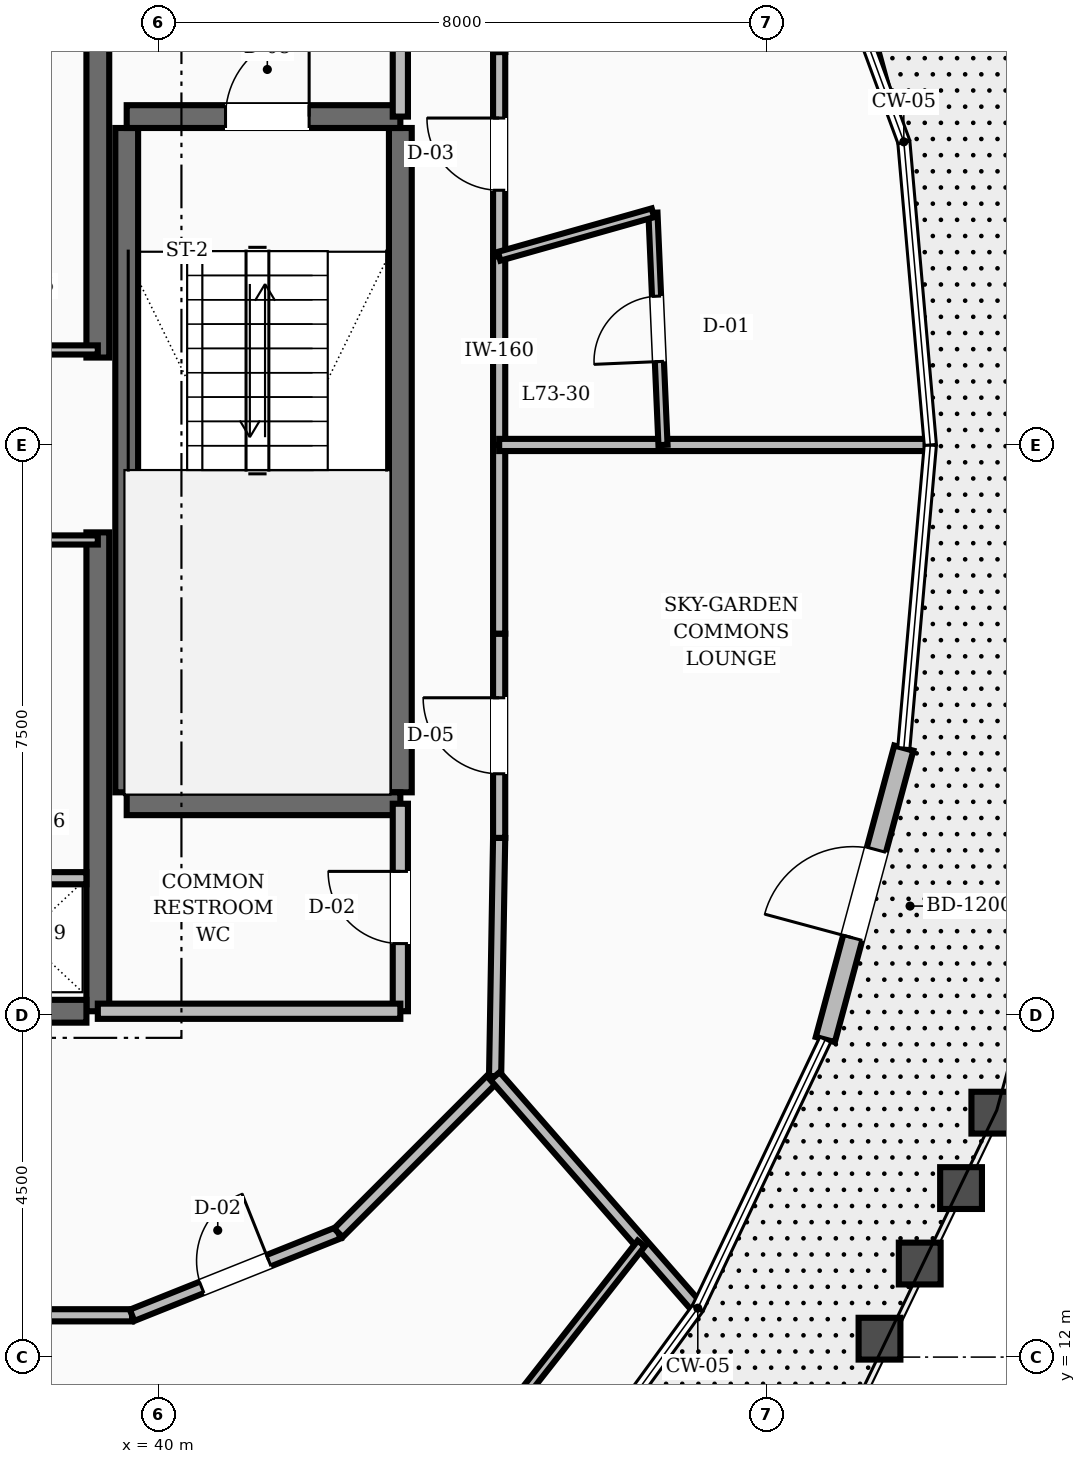
"""IFC4 building model, lengths in metres.
Left out: names, types, materials, properties, quantities, classifications, styles, units other than length and angle.
Written with IfcOpenShell. Run it as: python <this file> out.ifc"""

import sys

from ifc_helpers import new_model, si_unit, direction, frame, frame_2d, origin, place, context, subcontext, project, spatial, rectangle, extrude, element, fill, save


model = new_model("IFC4")
c1 = context("Model", 3, precision=1e-05, world=origin(), true_north=direction((0.0, 1.0)))
c2 = subcontext(c1, "Body", "Model", "MODEL_VIEW")
j1 = project(units=[si_unit("LENGTHUNIT", "METRE"), si_unit("PLANEANGLEUNIT", "RADIAN")], contexts=[c1])
p1 = place(None, origin())
s1 = spatial("IfcSite", under=j1, at=p1, CompositionType="ELEMENT")
p2 = place(p1, origin())
s2 = spatial("IfcBuilding", under=s1, at=p2, CompositionType="ELEMENT")
p3 = place(p2, frame((0.0, 0.0, 279.6)))
s3 = spatial("IfcBuildingStorey", under=s2, at=p3, CompositionType="ELEMENT", Elevation=279.6)
for number, where, z_axis, x_axis in (
    (1, (39.2, 16.55, 0.0), (0.0, 0.0, 1.0), (0.0, 1.0, 0.0)),
    (2, (39.2, 25.15, 0.0), (0.0, 0.0, 1.0), (0.0, 1.0, 0.0)),
):
    element("IfcWall", number, at=place(p3, frame(where, z_axis=z_axis, x_axis=x_axis)), inside=s3, PredefinedType="SHEAR", context=c2, shape_type="SweptSolid", body=[
        extrude(rectangle(XDim=6.3, YDim=0.3, at=frame_2d((3.15, 0.0))), origin(), (0.0, 0.0, 1.0), 3.6),
    ])
p4 = place(p3, frame((35.8, 16.55, 0.0), z_axis=(0.0, 0.0, 1.0), x_axis=(1.0, 0.0, 0.0)))
e3 = element("IfcWall", 3, at=p4, inside=s3, PredefinedType="SHEAR", context=c2, shape_type="SweptSolid", body=[
    extrude(rectangle(XDim=3.25, YDim=0.3, at=frame_2d((1.625, 0.0))), origin(), (0.0, 0.0, 1.0), 3.6),
])
p5 = place(p4, frame((0.3, 0.0, 0.0)))
e4 = element("IfcOpeningElement", 4, at=p5, cuts=e3, PredefinedType="OPENING", context=c2, shape_type="SweptSolid", body=[
    extrude(rectangle(XDim=1.1, YDim=2.1, at=frame_2d((0.55, 1.05))), frame((0.0, 0.16, 0.0), z_axis=(0.0, -1.0, 0.0), x_axis=(1.0, 0.0, 0.0)), (0.0, 0.0, 1.0), 0.32),
])
for number, where, z_axis, x_axis in (
    (5, (43.18, 19.43, 0.0), (0.0, 0.0, 1.0), (0.0, 1.0, 0.0)),
    (6, (39.58, 19.43, 0.0), (0.0, 0.0, 1.0), (0.0, 1.0, 0.0)),
):
    element("IfcWall", number, at=place(p3, frame(where, z_axis=z_axis, x_axis=x_axis)), inside=s3, PredefinedType="SHEAR", context=c2, shape_type="SweptSolid", body=[
        extrude(rectangle(XDim=8.74, YDim=0.3, at=frame_2d((4.37, 0.0))), origin(), (0.0, 0.0, 1.0), 3.6),
    ])
p6 = place(p3, frame((39.58, 19.28, 0.0), z_axis=(0.0, 0.0, 1.0), x_axis=(1.0, 0.0, 0.0)))
e7 = element("IfcWall", 7, at=p6, inside=s3, PredefinedType="SHEAR", context=c2, shape_type="SweptSolid", body=[
    extrude(rectangle(XDim=3.6, YDim=0.3, at=frame_2d((1.8, 0.0))), origin(), (0.0, 0.0, 1.0), 3.6),
])
p7 = place(p3, frame((39.58, 28.32, 0.0), z_axis=(0.0, 0.0, 1.0), x_axis=(1.0, 0.0, 0.0)))
e8 = element("IfcWall", 8, at=p7, inside=s3, PredefinedType="SHEAR", context=c2, shape_type="SweptSolid", body=[
    extrude(rectangle(XDim=3.6, YDim=0.3, at=frame_2d((1.8, 0.0))), origin(), (0.0, 0.0, 1.0), 3.6),
])
p8 = place(p7, frame((1.3, 0.0, 0.0)))
e9 = element("IfcOpeningElement", 9, at=p8, cuts=e8, PredefinedType="OPENING", context=c2, shape_type="SweptSolid", body=[
    extrude(rectangle(XDim=1.1, YDim=2.1, at=frame_2d((0.55, 1.05))), frame((0.0, 0.16, 0.0), z_axis=(0.0, -1.0, 0.0), x_axis=(1.0, 0.0, 0.0)), (0.0, 0.0, 1.0), 0.32),
])
p9 = place(p3, frame((48.771, 16.178, 0.0), z_axis=(0.0, 0.0, 1.0), x_axis=(0.260114573909, 0.965577758878, 0.0)))
e10 = element("IfcWall", 10, at=p9, inside=s3, PredefinedType="STANDARD", context=c2, shape_type="SweptSolid", body=[
    extrude(rectangle(XDim=3.971, YDim=0.26, at=frame_2d((1.986, 0.0))), origin(), (0.0, 0.0, 1.0), 2.88),
])
p10 = place(p9, frame((1.385, 0.0, 0.0)))
e11 = element("IfcOpeningElement", 11, at=p10, cuts=e10, PredefinedType="OPENING", context=c2, shape_type="SweptSolid", body=[
    extrude(rectangle(XDim=1.2, YDim=2.15, at=frame_2d((0.6, 1.075))), frame((0.0, 0.14, 0.0), z_axis=(0.0, -1.0, 0.0), x_axis=(1.0, 0.0, 0.0)), (0.0, 0.0, 1.0), 0.28),
])
p11 = place(p3, frame((43.18, 28.32, 0.0), z_axis=(0.0, 0.0, 1.0), x_axis=(0.0, 1.0, 0.0)))
e12 = element("IfcWall", 12, at=p11, inside=s3, PredefinedType="SOLIDWALL", context=c2, shape_type="SweptSolid", body=[
    extrude(rectangle(XDim=3.13, YDim=0.2, at=frame_2d((1.565, 0.0))), origin(), (0.0, 0.0, 1.0), 2.87),
])
p12 = place(p11, frame((1.015, 0.0, 0.0)))
e13 = element("IfcOpeningElement", 13, at=p12, cuts=e12, PredefinedType="OPENING", context=c2, shape_type="SweptSolid", body=[
    extrude(rectangle(XDim=1.1, YDim=2.1, at=frame_2d((0.55, 1.05))), frame((0.0, 0.11, 0.0), z_axis=(0.0, -1.0, 0.0), x_axis=(1.0, 0.0, 0.0)), (0.0, 0.0, 1.0), 0.22),
])
p13 = place(p3, frame((43.18, 16.55, 0.0), z_axis=(0.0, 0.0, 1.0), x_axis=(0.0, 1.0, 0.0)))
e14 = element("IfcWall", 14, at=p13, inside=s3, PredefinedType="SOLIDWALL", context=c2, shape_type="SweptSolid", body=[
    extrude(rectangle(XDim=2.73, YDim=0.2, at=frame_2d((1.365, 0.0))), origin(), (0.0, 0.0, 1.0), 2.87),
])
p14 = place(p13, frame((0.89, 0.0, 0.0)))
e15 = element("IfcOpeningElement", 15, at=p14, cuts=e14, PredefinedType="OPENING", context=c2, shape_type="SweptSolid", body=[
    extrude(rectangle(XDim=0.95, YDim=2.1, at=frame_2d((0.475, 1.05))), frame((0.0, 0.11, 0.0), z_axis=(0.0, -1.0, 0.0), x_axis=(1.0, 0.0, 0.0)), (0.0, 0.0, 1.0), 0.22),
])
p15 = place(p3, frame((39.2, 16.55, 0.0), z_axis=(0.0, 0.0, 1.0), x_axis=(1.0, 0.0, 0.0)))
e16 = element("IfcWall", 16, at=p15, inside=s3, PredefinedType="SOLIDWALL", context=c2, shape_type="SweptSolid", body=[
    extrude(rectangle(XDim=3.98, YDim=0.2, at=frame_2d((1.99, 0.0))), origin(), (0.0, 0.0, 1.0), 2.87),
])
p16 = place(p3, frame((37.4, 18.3, 0.0), z_axis=(0.0, 0.0, 1.0), x_axis=(1.0, 0.0, 0.0)))
e17 = element("IfcWall", 17, at=p16, inside=s3, PredefinedType="SOLIDWALL", context=c2, shape_type="SweptSolid", body=[
    extrude(rectangle(XDim=1.65, YDim=0.16, at=frame_2d((0.825, 0.0))), origin(), (0.0, 0.0, 1.0), 2.87),
])
for number, where, z_axis, x_axis in (
    (18, (37.4, 25.25, 0.0), (0.0, 0.0, 1.0), (1.0, 0.0, 0.0)),
    (19, (37.4, 22.75, 0.0), (0.0, 0.0, 1.0), (1.0, 0.0, 0.0)),
):
    element("IfcWall", number, at=place(p3, frame(where, z_axis=z_axis, x_axis=x_axis)), inside=s3, PredefinedType="PARTITIONING", context=c2, shape_type="SweptSolid", body=[
        extrude(rectangle(XDim=1.8, YDim=0.12, at=frame_2d((0.9, 0.0))), origin(), (0.0, 0.0, 1.0), 2.87),
    ])
p17 = place(p3, frame((44.48, 24.0, 0.0), z_axis=(0.0, 0.0, 1.0), x_axis=(0.0, 1.0, 0.0)))
e20 = element("IfcWall", 20, at=p17, inside=s3, PredefinedType="SOLIDWALL", context=c2, shape_type="SweptSolid", body=[
    extrude(rectangle(XDim=2.482, YDim=0.16, at=frame_2d((1.241, 0.0))), origin(), (0.0, 0.0, 1.0), 2.87),
])
p18 = place(p3, frame((44.48, 26.482, 0.0), z_axis=(0.0, 0.0, 1.0), x_axis=(0.0, 1.0, 0.0)))
e21 = element("IfcWall", 21, at=p18, inside=s3, PredefinedType="SOLIDWALL", context=c2, shape_type="SweptSolid", body=[
    extrude(rectangle(XDim=2.687, YDim=0.16, at=frame_2d((1.344, 0.0))), origin(), (0.0, 0.0, 1.0), 2.87),
])
p19 = place(p18, frame((0.868, 0.0, 0.0)))
e22 = element("IfcOpeningElement", 22, at=p19, cuts=e21, PredefinedType="OPENING", context=c2, shape_type="SweptSolid", body=[
    extrude(rectangle(XDim=0.95, YDim=2.1, at=frame_2d((0.475, 1.05))), frame((0.0, 0.09, 0.0), z_axis=(0.0, -1.0, 0.0), x_axis=(1.0, 0.0, 0.0)), (0.0, 0.0, 1.0), 0.18),
])
p20 = place(p3, frame((44.48, 29.169, 0.0), z_axis=(0.0, 0.0, 1.0), x_axis=(-0.016981035134, 0.999855811828, 0.0)))
e23 = element("IfcWall", 23, at=p20, inside=s3, PredefinedType="SOLIDWALL", context=c2, shape_type="SweptSolid", body=[
    extrude(rectangle(XDim=3.134, YDim=0.16, at=frame_2d((1.567, 0.0))), origin(), (0.0, 0.0, 1.0), 2.87),
])
p21 = place(p3, frame((36.743, 12.55, 0.0), z_axis=(0.0, 0.0, 1.0), x_axis=(1.0, 0.0, 0.0)))
e24 = element("IfcWall", 24, at=p21, inside=s3, PredefinedType="SOLIDWALL", context=c2, shape_type="SweptSolid", body=[
    extrude(rectangle(XDim=2.908, YDim=0.16, at=frame_2d((1.454, 0.0))), origin(), (0.0, 0.0, 1.0), 2.87),
])
p22 = place(p3, frame((39.651, 12.55, 0.0), z_axis=(0.0, 0.0, 1.0), x_axis=(0.92856882165, 0.371160266542, 0.0)))
e25 = element("IfcWall", 25, at=p22, inside=s3, PredefinedType="SOLIDWALL", context=c2, shape_type="SweptSolid", body=[
    extrude(rectangle(XDim=2.923, YDim=0.16, at=frame_2d((1.461, 0.0))), origin(), (0.0, 0.0, 1.0), 2.87),
])
p23 = place(p22, frame((0.987, 0.0, 0.0)))
e26 = element("IfcOpeningElement", 26, at=p23, cuts=e25, PredefinedType="OPENING", context=c2, shape_type="SweptSolid", body=[
    extrude(rectangle(XDim=0.95, YDim=2.1, at=frame_2d((0.475, 1.05))), frame((0.0, 0.09, 0.0), z_axis=(0.0, -1.0, 0.0), x_axis=(1.0, 0.0, 0.0)), (0.0, 0.0, 1.0), 0.18),
])
p24 = place(p3, frame((42.365, 13.635, 0.0), z_axis=(0.0, 0.0, 1.0), x_axis=(0.707106781187, 0.707106781187, 0.0)))
e27 = element("IfcWall", 27, at=p24, inside=s3, PredefinedType="SOLIDWALL", context=c2, shape_type="SweptSolid", body=[
    extrude(rectangle(XDim=2.916, YDim=0.16, at=frame_2d((1.458, 0.0))), origin(), (0.0, 0.0, 1.0), 2.87),
])
p25 = place(p3, frame((44.427, 15.697, 0.0), z_axis=(0.0, 0.0, 1.0), x_axis=(0.016981035134, 0.999855811828, 0.0)))
e28 = element("IfcWall", 28, at=p25, inside=s3, PredefinedType="SOLIDWALL", context=c2, shape_type="SweptSolid", body=[
    extrude(rectangle(XDim=3.134, YDim=0.16, at=frame_2d((1.567, 0.0))), origin(), (0.0, 0.0, 1.0), 2.87),
])
p26 = place(p3, frame((44.48, 18.831, 0.0), z_axis=(0.0, 0.0, 1.0), x_axis=(0.0, 1.0, 0.0)))
e29 = element("IfcWall", 29, at=p26, inside=s3, PredefinedType="SOLIDWALL", context=c2, shape_type="SweptSolid", body=[
    extrude(rectangle(XDim=2.687, YDim=0.16, at=frame_2d((1.344, 0.0))), origin(), (0.0, 0.0, 1.0), 2.87),
])
p27 = place(p26, frame((0.844, 0.0, 0.0)))
e30 = element("IfcOpeningElement", 30, at=p27, cuts=e29, PredefinedType="OPENING", context=c2, shape_type="SweptSolid", body=[
    extrude(rectangle(XDim=1.0, YDim=2.1, at=frame_2d((0.5, 1.05))), frame((0.0, 0.09, 0.0), z_axis=(0.0, -1.0, 0.0), x_axis=(1.0, 0.0, 0.0)), (0.0, 0.0, 1.0), 0.18),
])
p28 = place(p3, frame((44.48, 21.518, 0.0), z_axis=(0.0, 0.0, 1.0), x_axis=(0.0, 1.0, 0.0)))
e31 = element("IfcWall", 31, at=p28, inside=s3, PredefinedType="SOLIDWALL", context=c2, shape_type="SweptSolid", body=[
    extrude(rectangle(XDim=2.482, YDim=0.16, at=frame_2d((1.241, 0.0))), origin(), (0.0, 0.0, 1.0), 2.87),
])
p29 = place(p3, frame((44.427, 15.697, 0.0), z_axis=(0.0, 0.0, 1.0), x_axis=(0.657843835953, -0.753154358348, 0.0)))
e32 = element("IfcWall", 32, at=p29, inside=s3, PredefinedType="SOLIDWALL", context=c2, shape_type="SweptSolid", body=[
    extrude(rectangle(XDim=4.004, YDim=0.16, at=frame_2d((2.002, 0.0))), origin(), (0.0, 0.0, 1.0), 2.87),
])
p30 = place(p3, frame((44.48, 24.0, 0.0), z_axis=(0.0, 0.0, 1.0), x_axis=(1.0, 0.0, 0.0)))
e33 = element("IfcWall", 33, at=p30, inside=s3, PredefinedType="SOLIDWALL", context=c2, shape_type="SweptSolid", body=[
    extrude(rectangle(XDim=5.623, YDim=0.16, at=frame_2d((2.812, 0.0))), origin(), (0.0, 0.0, 1.0), 2.87),
])
p31 = place(p3, frame((46.635, 24.0, 0.0), z_axis=(0.0, 0.0, 1.0), x_axis=(-0.043281280957, 0.999062926306, 0.0)))
e34 = element("IfcWall", 34, at=p31, inside=s3, PredefinedType="PARTITIONING", context=c2, shape_type="SweptSolid", body=[
    extrude(rectangle(XDim=3.057, YDim=0.12, at=frame_2d((1.529, 0.0))), origin(), (0.0, 0.0, 1.0), 2.87),
])
p32 = place(p31, frame((1.099, 0.0, 0.0)))
e35 = element("IfcOpeningElement", 35, at=p32, cuts=e34, PredefinedType="OPENING", context=c2, shape_type="SweptSolid", body=[
    extrude(rectangle(XDim=0.86, YDim=2.1, at=frame_2d((0.43, 1.05))), frame((0.0, 0.07, 0.0), z_axis=(0.0, -1.0, 0.0), x_axis=(1.0, 0.0, 0.0)), (0.0, 0.0, 1.0), 0.14),
])
p33 = place(p3, frame((44.48, 26.482, 0.0), z_axis=(0.0, 0.0, 1.0), x_axis=(0.962278347066, 0.272066871869, 0.0)))
e36 = element("IfcWall", 36, at=p33, inside=s3, PredefinedType="PARTITIONING", context=c2, shape_type="SweptSolid", body=[
    extrude(rectangle(XDim=2.103, YDim=0.12, at=frame_2d((1.051, 0.0))), origin(), (0.0, 0.0, 1.0), 2.87),
])
p34 = place(p3, frame((36.743, 12.55, 0.0), z_axis=(0.0, 0.0, 1.0), x_axis=(0.28423289616, -0.958755266343, 0.0)))
e37 = element("IfcWall", 37, at=p34, inside=s3, PredefinedType="SOLIDWALL", context=c2, shape_type="SweptSolid", body=[
    extrude(rectangle(XDim=7.705, YDim=0.16, at=frame_2d((3.853, 0.0))), origin(), (0.0, 0.0, 1.0), 2.87),
])
p35 = place(p3, frame((44.146, 10.687, 0.0), z_axis=(0.0, 0.0, 1.0), x_axis=(0.617150729588, 0.786844951035, 0.0)))
e38 = element("IfcWall", 38, at=p35, inside=s3, PredefinedType="PARTITIONING", context=c2, shape_type="SweptSolid", body=[
    extrude(rectangle(XDim=3.569, YDim=0.12, at=frame_2d((1.785, 0.0))), origin(), (0.0, 0.0, 1.0), 2.87),
])
p36 = place(p10, origin())
e39 = element("IfcDoor", 39, at=p36, inside=s3, OperationType="SINGLE_SWING_LEFT", PredefinedType="DOOR", context=c2, shape_type="SweptSolid", body=[
    extrude(rectangle(XDim=1.2, YDim=2.15, at=frame_2d((0.6, 1.075))), frame((0.0, 0.025, 0.0), z_axis=(0.0, -1.0, 0.0), x_axis=(1.0, 0.0, 0.0)), (0.0, 0.0, 1.0), 0.05),
])
fill(e11, e39)
p37 = place(p8, origin())
e40 = element("IfcDoor", 40, at=p37, inside=s3, OperationType="SINGLE_SWING_RIGHT", PredefinedType="DOOR", context=c2, shape_type="SweptSolid", body=[
    extrude(rectangle(XDim=1.1, YDim=2.1, at=frame_2d((0.55, 1.05))), frame((0.0, 0.025, 0.0), z_axis=(0.0, -1.0, 0.0), x_axis=(1.0, 0.0, 0.0)), (0.0, 0.0, 1.0), 0.05),
])
fill(e9, e40)
p38 = place(p14, origin())
e41 = element("IfcDoor", 41, at=p38, inside=s3, OperationType="SINGLE_SWING_RIGHT", PredefinedType="DOOR", context=c2, shape_type="SweptSolid", body=[
    extrude(rectangle(XDim=0.95, YDim=2.1, at=frame_2d((0.475, 1.05))), frame((0.0, 0.025, 0.0), z_axis=(0.0, -1.0, 0.0), x_axis=(1.0, 0.0, 0.0)), (0.0, 0.0, 1.0), 0.05),
])
fill(e15, e41)
p39 = place(p27, origin())
e42 = element("IfcDoor", 42, at=p39, inside=s3, OperationType="SINGLE_SWING_RIGHT", PredefinedType="DOOR", context=c2, shape_type="SweptSolid", body=[
    extrude(rectangle(XDim=1.0, YDim=2.1, at=frame_2d((0.5, 1.05))), frame((0.0, 0.025, 0.0), z_axis=(0.0, -1.0, 0.0), x_axis=(1.0, 0.0, 0.0)), (0.0, 0.0, 1.0), 0.05),
])
fill(e30, e42)
p40 = place(p32, origin())
e43 = element("IfcDoor", 43, at=p40, inside=s3, OperationType="SINGLE_SWING_LEFT", PredefinedType="DOOR", context=c2, shape_type="SweptSolid", body=[
    extrude(rectangle(XDim=0.86, YDim=2.1, at=frame_2d((0.43, 1.05))), frame((0.0, 0.025, 0.0), z_axis=(0.0, -1.0, 0.0), x_axis=(1.0, 0.0, 0.0)), (0.0, 0.0, 1.0), 0.05),
])
fill(e35, e43)
p41 = place(p19, origin())
e44 = element("IfcDoor", 44, at=p41, inside=s3, OperationType="SINGLE_SWING_RIGHT", PredefinedType="DOOR", context=c2, shape_type="SweptSolid", body=[
    extrude(rectangle(XDim=0.95, YDim=2.1, at=frame_2d((0.475, 1.05))), frame((0.0, 0.025, 0.0), z_axis=(0.0, -1.0, 0.0), x_axis=(1.0, 0.0, 0.0)), (0.0, 0.0, 1.0), 0.05),
])
fill(e22, e44)
p42 = place(p23, origin())
e45 = element("IfcDoor", 45, at=p42, inside=s3, OperationType="SINGLE_SWING_RIGHT", PredefinedType="DOOR", context=c2, shape_type="SweptSolid", body=[
    extrude(rectangle(XDim=0.95, YDim=2.1, at=frame_2d((0.475, 1.05))), frame((0.0, 0.025, 0.0), z_axis=(0.0, -1.0, 0.0), x_axis=(1.0, 0.0, 0.0)), (0.0, 0.0, 1.0), 0.05),
])
fill(e26, e45)
save(model, sys.argv[1])
